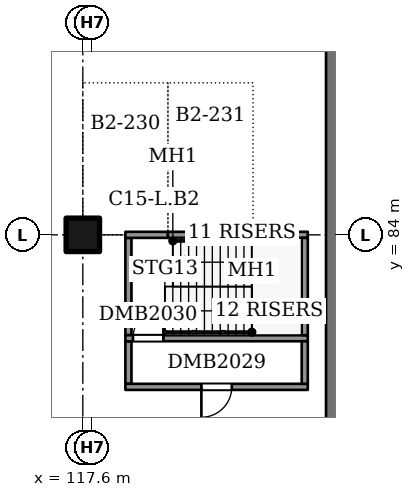
"""IFC4 building model, lengths in metres.
Left out: names, types, materials, properties, quantities, classifications, styles, units other than length and angle.
Written with IfcOpenShell. Run it as: python <this file> out.ifc"""

import sys

from ifc_helpers import new_model, si_unit, direction, frame, frame_2d, origin, origin_2d, place, context, subcontext, project, spatial, rectangle, extrude, element, fill, save


model = new_model("IFC4")
c1 = context("Model", 3, precision=1e-05, world=origin(), true_north=direction((0.0, 1.0)))
c2 = subcontext(c1, "Body", "Model", "MODEL_VIEW")
j1 = project(units=[si_unit("LENGTHUNIT", "METRE"), si_unit("PLANEANGLEUNIT", "RADIAN")], contexts=[c1])
p1 = place(None, origin())
s1 = spatial("IfcSite", under=j1, at=p1, CompositionType="ELEMENT")
p2 = place(p1, origin())
s2 = spatial("IfcBuilding", under=s1, at=p2, CompositionType="ELEMENT")
p3 = place(p2, frame((0.0, 0.0, -8.0)))
s3 = spatial("IfcBuildingStorey", under=s2, at=p3, CompositionType="ELEMENT", Elevation=-8.0)
p4 = place(p3, frame((126.0, 37.4, 0.0), z_axis=(0.0, 0.0, 1.0), x_axis=(0.0, 1.0, 0.0)))
e1 = element("IfcWall", 1, at=p4, inside=s3, PredefinedType="SOLIDWALL", context=c2, shape_type="SweptSolid", body=[
    extrude(rectangle(XDim=63.0, YDim=0.8, at=frame_2d((31.5, 0.0))), origin(), (0.0, 0.0, 1.0), 3.7),
])
p5 = place(p3, frame((117.6, 84.0, 0.0), z_axis=(0.0, 0.0, 1.0), x_axis=(1.0, 0.0, 0.0)))
e2 = element("IfcColumn", 2, at=p5, inside=s3, PredefinedType="COLUMN", context=c2, shape_type="SweptSolid", body=[
    extrude(rectangle(XDim=1.1, YDim=1.1, at=origin_2d()), origin(), (0.0, 0.0, 1.0), 3.7),
])
p6 = place(p3, frame((119.1, 79.1, 0.0), z_axis=(0.0, 0.0, 1.0), x_axis=(0.0, 1.0, 0.0)))
e3 = element("IfcWall", 3, at=p6, inside=s3, PredefinedType="SOLIDWALL", context=c2, shape_type="SweptSolid", body=[
    extrude(rectangle(XDim=1.4, YDim=0.2, at=frame_2d((0.7, 0.0))), origin(), (0.0, 0.0, 1.0), 3.7),
])
p7 = place(p3, frame((119.0, 79.0, 0.0), z_axis=(0.0, 0.0, 1.0), x_axis=(1.0, 0.0, 0.0)))
e4 = element("IfcWall", 4, at=p7, inside=s3, PredefinedType="SOLIDWALL", context=c2, shape_type="SweptSolid", body=[
    extrude(rectangle(XDim=6.0, YDim=0.2, at=frame_2d((3.0, 0.0))), origin(), (0.0, 0.0, 1.0), 3.7),
])
p8 = place(p7, frame((2.5, 0.0, 0.0)))
e5 = element("IfcOpeningElement", 5, at=p8, cuts=e4, PredefinedType="OPENING", context=c2, shape_type="SweptSolid", body=[
    extrude(rectangle(XDim=1.0, YDim=2.1, at=frame_2d((0.5, 1.05))), frame((0.0, 0.11, 0.0), z_axis=(0.0, -1.0, 0.0), x_axis=(1.0, 0.0, 0.0)), (0.0, 0.0, 1.0), 0.22),
])
p9 = place(p3, frame((119.1, 80.7, 0.0), z_axis=(0.0, 0.0, 1.0), x_axis=(0.0, 1.0, 0.0)))
e6 = element("IfcWall", 6, at=p9, inside=s3, PredefinedType="SOLIDWALL", context=c2, shape_type="SweptSolid", body=[
    extrude(rectangle(XDim=3.2, YDim=0.2, at=frame_2d((1.6, 0.0))), origin(), (0.0, 0.0, 1.0), 3.7),
])
p10 = place(p3, frame((119.0, 80.6, 0.0), z_axis=(0.0, 0.0, 1.0), x_axis=(1.0, 0.0, 0.0)))
e7 = element("IfcWall", 7, at=p10, inside=s3, PredefinedType="SOLIDWALL", context=c2, shape_type="SweptSolid", body=[
    extrude(rectangle(XDim=6.0, YDim=0.2, at=frame_2d((3.0, 0.0))), origin(), (0.0, 0.0, 1.0), 3.7),
])
p11 = place(p10, frame((0.25, 0.0, 0.0)))
e8 = element("IfcOpeningElement", 8, at=p11, cuts=e7, PredefinedType="OPENING", context=c2, shape_type="SweptSolid", body=[
    extrude(rectangle(XDim=1.0, YDim=2.1, at=frame_2d((0.5, 1.05))), frame((0.0, 0.11, 0.0), z_axis=(0.0, -1.0, 0.0), x_axis=(1.0, 0.0, 0.0)), (0.0, 0.0, 1.0), 0.22),
])
p12 = place(p3, frame((119.0, 84.0, 0.0), z_axis=(0.0, 0.0, 1.0), x_axis=(1.0, 0.0, 0.0)))
e9 = element("IfcWall", 9, at=p12, inside=s3, PredefinedType="SOLIDWALL", context=c2, shape_type="SweptSolid", body=[
    extrude(rectangle(XDim=1.4, YDim=0.2, at=frame_2d((0.7, 0.0))), origin(), (0.0, 0.0, 1.0), 3.7),
])
p13 = place(p3, frame((120.4, 84.0, 0.0), z_axis=(0.0, 0.0, 1.0), x_axis=(1.0, 0.0, 0.0)))
e10 = element("IfcWall", 10, at=p13, inside=s3, PredefinedType="SOLIDWALL", context=c2, shape_type="SweptSolid", body=[
    extrude(rectangle(XDim=2.8, YDim=0.2, at=frame_2d((1.4, 0.0))), origin(), (0.0, 0.0, 1.0), 3.7),
])
p14 = place(p3, frame((123.2, 84.0, 0.0), z_axis=(0.0, 0.0, 1.0), x_axis=(1.0, 0.0, 0.0)))
e11 = element("IfcWall", 11, at=p14, inside=s3, PredefinedType="SOLIDWALL", context=c2, shape_type="SweptSolid", body=[
    extrude(rectangle(XDim=1.8, YDim=0.2, at=frame_2d((0.9, 0.0))), origin(), (0.0, 0.0, 1.0), 3.7),
])
p15 = place(p3, frame((124.9, 79.1, 0.0), z_axis=(0.0, 0.0, 1.0), x_axis=(0.0, 1.0, 0.0)))
e12 = element("IfcWall", 12, at=p15, inside=s3, PredefinedType="SOLIDWALL", context=c2, shape_type="SweptSolid", body=[
    extrude(rectangle(XDim=1.4, YDim=0.2, at=frame_2d((0.7, 0.0))), origin(), (0.0, 0.0, 1.0), 3.7),
])
p16 = place(p3, frame((124.9, 80.7, 0.0), z_axis=(0.0, 0.0, 1.0), x_axis=(0.0, 1.0, 0.0)))
e13 = element("IfcWall", 13, at=p16, inside=s3, PredefinedType="SOLIDWALL", context=c2, shape_type="SweptSolid", body=[
    extrude(rectangle(XDim=3.2, YDim=0.2, at=frame_2d((1.6, 0.0))), origin(), (0.0, 0.0, 1.0), 3.7),
])
p17 = place(p8, frame((1.0, 0.0, 0.0), z_axis=(0.0, 0.0, 1.0), x_axis=(-1.0, 0.0, 0.0)))
e14 = element("IfcDoor", 14, at=p17, inside=s3, OperationType="SINGLE_SWING_RIGHT", PredefinedType="DOOR", context=c2, shape_type="SweptSolid", body=[
    extrude(rectangle(XDim=1.0, YDim=2.1, at=frame_2d((0.5, 1.05))), frame((0.0, 0.025, 0.0), z_axis=(0.0, -1.0, 0.0), x_axis=(1.0, 0.0, 0.0)), (0.0, 0.0, 1.0), 0.05),
])
fill(e5, e14)
p18 = place(p11, origin())
e15 = element("IfcDoor", 15, at=p18, inside=s3, OperationType="SINGLE_SWING_RIGHT", PredefinedType="DOOR", context=c2, shape_type="SweptSolid", body=[
    extrude(rectangle(XDim=1.0, YDim=2.1, at=frame_2d((0.5, 1.05))), frame((0.0, 0.025, 0.0), z_axis=(0.0, -1.0, 0.0), x_axis=(1.0, 0.0, 0.0)), (0.0, 0.0, 1.0), 0.05),
])
fill(e8, e15)
save(model, sys.argv[1])
